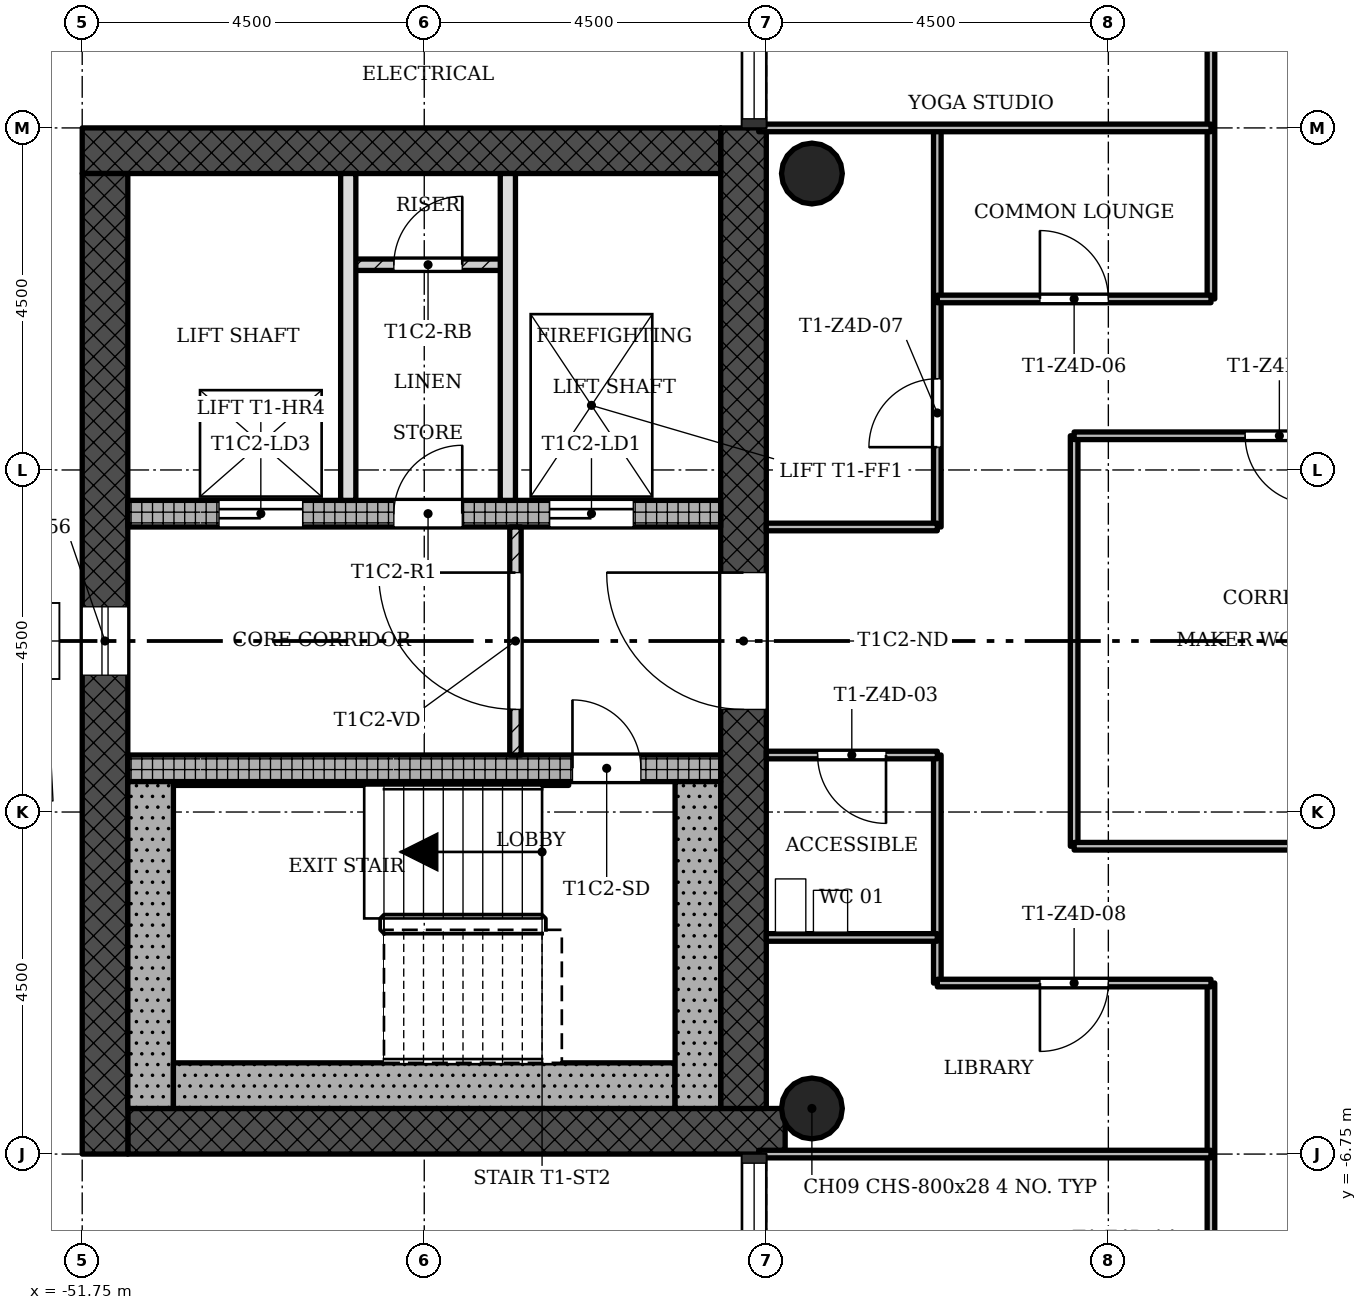
"""IFC4 building model, lengths in metres.
Left out: names, types, materials, properties, quantities, classifications, styles, units other than length and angle.
Written with IfcOpenShell. Run it as: python <this file> out.ifc"""

import sys

from ifc_helpers import new_model, si_unit, direction, frame, frame_2d, origin, origin_2d, place, context, subcontext, project, spatial, rectangle, hollow_circle, extrude, element, fill, save


model = new_model("IFC4")
c1 = context("Model", 3, precision=1e-05, world=origin(), true_north=direction((0.0, 1.0)))
c2 = subcontext(c1, "Body", "Model", "MODEL_VIEW")
j1 = project(units=[si_unit("LENGTHUNIT", "METRE"), si_unit("PLANEANGLEUNIT", "RADIAN")], contexts=[c1])
p1 = place(None, origin())
s1 = spatial("IfcSite", under=j1, at=p1, CompositionType="ELEMENT")
p2 = place(p1, origin())
s2 = spatial("IfcBuilding", under=s1, at=p2, CompositionType="ELEMENT")
p3 = place(p2, frame((0.0, 0.0, 202.8)))
s3 = spatial("IfcBuildingStorey", under=s2, at=p3, CompositionType="ELEMENT", Elevation=202.8)
p4 = place(p3, frame((-51.15, -6.45, 0.0), z_axis=(0.0, 0.0, 1.0), x_axis=(1.0, 0.0, 0.0)))
e1 = element("IfcWall", 1, at=p4, inside=s3, PredefinedType="SHEAR", context=c2, shape_type="SweptSolid", body=[
    extrude(rectangle(XDim=8.648, YDim=0.6, at=frame_2d((4.324, 0.0))), origin(), (0.0, 0.0, 1.0), 3.4),
])
p5 = place(p3, frame((-43.05, -6.15, 0.0), z_axis=(0.0, 0.0, 1.0), x_axis=(0.0, 1.0, 0.0)))
e2 = element("IfcWall", 2, at=p5, inside=s3, PredefinedType="SHEAR", context=c2, shape_type="SweptSolid", body=[
    extrude(rectangle(XDim=12.9, YDim=0.6, at=frame_2d((6.45, 0.0))), origin(), (0.0, 0.0, 1.0), 3.4),
])
p6 = place(p5, frame((5.25, 0.0, 0.0)))
e3 = element("IfcOpeningElement", 3, at=p6, cuts=e2, PredefinedType="OPENING", context=c2, shape_type="SweptSolid", body=[
    extrude(rectangle(XDim=1.8, YDim=2.1, at=frame_2d((0.9, 1.05))), frame((0.0, 0.31, 0.0), z_axis=(0.0, -1.0, 0.0), x_axis=(1.0, 0.0, 0.0)), (0.0, 0.0, 1.0), 0.62),
])
p7 = place(p3, frame((-43.35, 6.45, 0.0), z_axis=(0.0, 0.0, 1.0), x_axis=(-1.0, 0.0, 0.0)))
e4 = element("IfcWall", 4, at=p7, inside=s3, PredefinedType="SHEAR", context=c2, shape_type="SweptSolid", body=[
    extrude(rectangle(XDim=8.4, YDim=0.6, at=frame_2d((4.2, 0.0))), origin(), (0.0, 0.0, 1.0), 3.4),
])
p8 = place(p3, frame((-51.45, 6.15, 0.0), z_axis=(0.0, 0.0, 1.0), x_axis=(0.0, -1.0, 0.0)))
e5 = element("IfcWall", 5, at=p8, inside=s3, PredefinedType="SHEAR", context=c2, shape_type="SweptSolid", body=[
    extrude(rectangle(XDim=12.9, YDim=0.6, at=frame_2d((6.45, 0.0))), origin(), (0.0, 0.0, 1.0), 3.4),
])
p9 = place(p8, frame((5.7, 0.0, 0.45)))
e6 = element("IfcOpeningElement", 6, at=p9, cuts=e5, PredefinedType="OPENING", context=c2, shape_type="SweptSolid", body=[
    extrude(rectangle(XDim=0.9, YDim=2.4, at=frame_2d((0.45, 1.2))), frame((0.0, 0.31, 0.0), z_axis=(0.0, -1.0, 0.0), x_axis=(1.0, 0.0, 0.0)), (0.0, 0.0, 1.0), 0.62),
])
p10 = place(p3, frame((-51.15, -1.675, 0.0), z_axis=(0.0, 0.0, 1.0), x_axis=(1.0, 0.0, 0.0)))
e7 = element("IfcWall", 7, at=p10, inside=s3, PredefinedType="SHEAR", context=c2, shape_type="SweptSolid", body=[
    extrude(rectangle(XDim=7.8, YDim=0.35, at=frame_2d((3.9, 0.0))), origin(), (0.0, 0.0, 1.0), 3.4),
])
p11 = place(p10, frame((5.85, 0.0, 0.0)))
e8 = element("IfcOpeningElement", 8, at=p11, cuts=e7, PredefinedType="OPENING", context=c2, shape_type="SweptSolid", body=[
    extrude(rectangle(XDim=0.9, YDim=2.1, at=frame_2d((0.45, 1.05))), frame((0.0, 0.185, 0.0), z_axis=(0.0, -1.0, 0.0), x_axis=(1.0, 0.0, 0.0)), (0.0, 0.0, 1.0), 0.37),
])
p12 = place(p3, frame((-51.15, 1.675, 0.0), z_axis=(0.0, 0.0, 1.0), x_axis=(1.0, 0.0, 0.0)))
e9 = element("IfcWall", 9, at=p12, inside=s3, PredefinedType="SHEAR", context=c2, shape_type="SweptSolid", body=[
    extrude(rectangle(XDim=7.8, YDim=0.35, at=frame_2d((3.9, 0.0))), origin(), (0.0, 0.0, 1.0), 3.4),
])
p13 = place(p12, frame((5.55, 0.0, 0.0)))
e10 = element("IfcOpeningElement", 10, at=p13, cuts=e9, PredefinedType="OPENING", context=c2, shape_type="SweptSolid", body=[
    extrude(rectangle(XDim=1.1, YDim=2.1, at=frame_2d((0.55, 1.05))), frame((0.0, 0.185, 0.0), z_axis=(0.0, -1.0, 0.0), x_axis=(1.0, 0.0, 0.0)), (0.0, 0.0, 1.0), 0.37),
])
p14 = place(p12, frame((1.2, 0.0, 0.0)))
e11 = element("IfcOpeningElement", 11, at=p14, cuts=e9, PredefinedType="OPENING", context=c2, shape_type="SweptSolid", body=[
    extrude(rectangle(XDim=1.1, YDim=2.1, at=frame_2d((0.55, 1.05))), frame((0.0, 0.185, 0.0), z_axis=(0.0, -1.0, 0.0), x_axis=(1.0, 0.0, 0.0)), (0.0, 0.0, 1.0), 0.37),
])
p15 = place(p12, frame((3.5, 0.0, 0.0)))
e12 = element("IfcOpeningElement", 12, at=p15, cuts=e9, PredefinedType="OPENING", context=c2, shape_type="SweptSolid", body=[
    extrude(rectangle(XDim=0.9, YDim=2.1, at=frame_2d((0.45, 1.05))), frame((0.0, 0.185, 0.0), z_axis=(0.0, -1.0, 0.0), x_axis=(1.0, 0.0, 0.0)), (0.0, 0.0, 1.0), 0.37),
])
for number, where, z_axis, x_axis in (
    (13, (-42.15, -6.15, 0.0), (0.0, 0.0, 1.0), (1.0, 0.0, 0.0)),
    (14, (-42.15, 6.15, 0.0), (0.0, 0.0, 1.0), (1.0, 0.0, 0.0)),
):
    element("IfcColumn", number, at=place(p3, frame(where, z_axis=z_axis, x_axis=x_axis)), inside=s3, PredefinedType="COLUMN", context=c2, shape_type="SweptSolid", body=[
        extrude(hollow_circle(Radius=0.4, WallThickness=0.028, at=origin_2d()), origin(), (0.0, 0.0, 1.0), 3.4),
    ])
p16 = place(p3, frame((-46.05, 1.5, 0.0), z_axis=(0.0, 0.0, 1.0), x_axis=(0.0, -1.0, 0.0)))
e15 = element("IfcWall", 15, at=p16, inside=s3, PredefinedType="PARTITIONING", context=c2, shape_type="SweptSolid", body=[
    extrude(rectangle(XDim=3.0, YDim=0.15, at=frame_2d((1.5, 0.0))), origin(), (0.0, 0.0, 1.0), 3.0),
])
p17 = place(p16, frame((0.6, 0.0, 0.0)))
e16 = element("IfcOpeningElement", 16, at=p17, cuts=e15, PredefinedType="OPENING", context=c2, shape_type="SweptSolid", body=[
    extrude(rectangle(XDim=1.8, YDim=2.1, at=frame_2d((0.9, 1.05))), frame((0.0, 0.085, 0.0), z_axis=(0.0, -1.0, 0.0), x_axis=(1.0, 0.0, 0.0)), (0.0, 0.0, 1.0), 0.17),
])
for number, where, z_axis, x_axis in (
    (17, (-48.25, 6.15, 0.0), (0.0, 0.0, 1.0), (0.0, -1.0, 0.0)),
    (18, (-46.15, 6.15, 0.0), (0.0, 0.0, 1.0), (0.0, -1.0, 0.0)),
):
    element("IfcWall", number, at=place(p3, frame(where, z_axis=z_axis, x_axis=x_axis)), inside=s3, PredefinedType="SOLIDWALL", context=c2, shape_type="SweptSolid", body=[
        extrude(rectangle(XDim=4.3, YDim=0.2, at=frame_2d((2.15, 0.0))), origin(), (0.0, 0.0, 1.0), 3.0),
    ])
p18 = place(p3, frame((-46.15, 4.95, 0.0), z_axis=(0.0, 0.0, 1.0), x_axis=(-1.0, 0.0, 0.0)))
e19 = element("IfcWall", 19, at=p18, inside=s3, PredefinedType="PARTITIONING", context=c2, shape_type="SweptSolid", body=[
    extrude(rectangle(XDim=2.1, YDim=0.15, at=frame_2d((1.05, 0.0))), origin(), (0.0, 0.0, 1.0), 3.0),
])
p19 = place(p18, frame((0.6, 0.0, 0.0)))
e20 = element("IfcOpeningElement", 20, at=p19, cuts=e19, PredefinedType="OPENING", context=c2, shape_type="SweptSolid", body=[
    extrude(rectangle(XDim=0.9, YDim=2.1, at=frame_2d((0.45, 1.05))), frame((0.0, 0.085, 0.0), z_axis=(0.0, -1.0, 0.0), x_axis=(1.0, 0.0, 0.0)), (0.0, 0.0, 1.0), 0.17),
])
p20 = place(p3, frame((-40.5, -4.5, 0.0), z_axis=(0.0, 0.0, 1.0), x_axis=(0.0, 1.0, 0.0)))
e21 = element("IfcWall", 21, at=p20, inside=s3, PredefinedType="PARTITIONING", context=c2, shape_type="SweptSolid", body=[
    extrude(rectangle(XDim=3.0, YDim=0.1, at=frame_2d((1.5, 0.0))), origin(), (0.0, 0.0, 1.0), 3.0),
])
p21 = place(p3, frame((-40.5, 1.5, 0.0), z_axis=(0.0, 0.0, 1.0), x_axis=(0.0, 1.0, 0.0)))
e22 = element("IfcWall", 22, at=p21, inside=s3, PredefinedType="PARTITIONING", context=c2, shape_type="SweptSolid", body=[
    extrude(rectangle(XDim=5.25, YDim=0.1, at=frame_2d((2.625, 0.0))), origin(), (0.0, 0.0, 1.0), 3.0),
])
p22 = place(p21, frame((1.05, 0.0, 0.0)))
e23 = element("IfcOpeningElement", 23, at=p22, cuts=e22, PredefinedType="OPENING", context=c2, shape_type="SweptSolid", body=[
    extrude(rectangle(XDim=0.9, YDim=2.1, at=frame_2d((0.45, 1.05))), frame((0.0, 0.06, 0.0), z_axis=(0.0, -1.0, 0.0), x_axis=(1.0, 0.0, 0.0)), (0.0, 0.0, 1.0), 0.12),
])
p23 = place(p3, frame((-38.7, -2.7, 0.0), z_axis=(0.0, 0.0, 1.0), x_axis=(0.0, 1.0, 0.0)))
e24 = element("IfcWall", 24, at=p23, inside=s3, PredefinedType="PARTITIONING", context=c2, shape_type="SweptSolid", body=[
    extrude(rectangle(XDim=5.4, YDim=0.1, at=frame_2d((2.7, 0.0))), origin(), (0.0, 0.0, 1.0), 3.0),
])
p24 = place(p3, frame((-36.9, -11.25, 0.0), z_axis=(0.0, 0.0, 1.0), x_axis=(0.0, 1.0, 0.0)))
e25 = element("IfcWall", 25, at=p24, inside=s3, PredefinedType="PARTITIONING", context=c2, shape_type="SweptSolid", body=[
    extrude(rectangle(XDim=6.75, YDim=0.1, at=frame_2d((3.375, 0.0))), origin(), (0.0, 0.0, 1.0), 3.0),
])
p25 = place(p24, frame((1.8, 0.0, 0.0)))
e26 = element("IfcOpeningElement", 26, at=p25, cuts=e25, PredefinedType="OPENING", context=c2, shape_type="SweptSolid", body=[
    extrude(rectangle(XDim=0.9, YDim=2.1, at=frame_2d((0.45, 1.05))), frame((0.0, 0.06, 0.0), z_axis=(0.0, -1.0, 0.0), x_axis=(1.0, 0.0, 0.0)), (0.0, 0.0, 1.0), 0.12),
])
p26 = place(p3, frame((-36.9, 4.5, 0.0), z_axis=(0.0, 0.0, 1.0), x_axis=(0.0, 1.0, 0.0)))
e27 = element("IfcWall", 27, at=p26, inside=s3, PredefinedType="PARTITIONING", context=c2, shape_type="SweptSolid", body=[
    extrude(rectangle(XDim=4.05, YDim=0.1, at=frame_2d((2.025, 0.0))), origin(), (0.0, 0.0, 1.0), 3.0),
])
p27 = place(p3, frame((-42.85, -6.75, 0.0), z_axis=(0.0, 0.0, 1.0), x_axis=(1.0, 0.0, 0.0)))
e28 = element("IfcWall", 28, at=p27, inside=s3, PredefinedType="PARTITIONING", context=c2, shape_type="SweptSolid", body=[
    extrude(rectangle(XDim=5.95, YDim=0.1, at=frame_2d((2.975, 0.0))), origin(), (0.0, 0.0, 1.0), 3.0),
])
p28 = place(p3, frame((-40.5, -4.5, 0.0), z_axis=(0.0, 0.0, 1.0), x_axis=(1.0, 0.0, 0.0)))
e29 = element("IfcWall", 29, at=p28, inside=s3, PredefinedType="PARTITIONING", context=c2, shape_type="SweptSolid", body=[
    extrude(rectangle(XDim=3.6, YDim=0.1, at=frame_2d((1.8, 0.0))), origin(), (0.0, 0.0, 1.0), 3.0),
])
p29 = place(p28, frame((1.35, 0.0, 0.0)))
e30 = element("IfcOpeningElement", 30, at=p29, cuts=e29, PredefinedType="OPENING", context=c2, shape_type="SweptSolid", body=[
    extrude(rectangle(XDim=0.9, YDim=2.1, at=frame_2d((0.45, 1.05))), frame((0.0, 0.06, 0.0), z_axis=(0.0, -1.0, 0.0), x_axis=(1.0, 0.0, 0.0)), (0.0, 0.0, 1.0), 0.12),
])
p30 = place(p3, frame((-42.75, -3.9, 0.0), z_axis=(0.0, 0.0, 1.0), x_axis=(1.0, 0.0, 0.0)))
e31 = element("IfcWall", 31, at=p30, inside=s3, PredefinedType="PARTITIONING", context=c2, shape_type="SweptSolid", body=[
    extrude(rectangle(XDim=2.25, YDim=0.1, at=frame_2d((1.125, 0.0))), origin(), (0.0, 0.0, 1.0), 3.0),
])
p31 = place(p3, frame((-38.7, -2.7, 0.0), z_axis=(0.0, 0.0, 1.0), x_axis=(1.0, 0.0, 0.0)))
e32 = element("IfcWall", 32, at=p31, inside=s3, PredefinedType="PARTITIONING", context=c2, shape_type="SweptSolid", body=[
    extrude(rectangle(XDim=5.4, YDim=0.1, at=frame_2d((2.7, 0.0))), origin(), (0.0, 0.0, 1.0), 3.0),
])
p32 = place(p3, frame((-42.75, -1.5, 0.0), z_axis=(0.0, 0.0, 1.0), x_axis=(1.0, 0.0, 0.0)))
e33 = element("IfcWall", 33, at=p32, inside=s3, PredefinedType="PARTITIONING", context=c2, shape_type="SweptSolid", body=[
    extrude(rectangle(XDim=2.25, YDim=0.1, at=frame_2d((1.125, 0.0))), origin(), (0.0, 0.0, 1.0), 3.0),
])
p33 = place(p32, frame((0.675, 0.0, 0.0)))
e34 = element("IfcOpeningElement", 34, at=p33, cuts=e33, PredefinedType="OPENING", context=c2, shape_type="SweptSolid", body=[
    extrude(rectangle(XDim=0.9, YDim=2.1, at=frame_2d((0.45, 1.05))), frame((0.0, 0.06, 0.0), z_axis=(0.0, -1.0, 0.0), x_axis=(1.0, 0.0, 0.0)), (0.0, 0.0, 1.0), 0.12),
])
p34 = place(p3, frame((-42.75, 1.5, 0.0), z_axis=(0.0, 0.0, 1.0), x_axis=(1.0, 0.0, 0.0)))
e35 = element("IfcWall", 35, at=p34, inside=s3, PredefinedType="PARTITIONING", context=c2, shape_type="SweptSolid", body=[
    extrude(rectangle(XDim=2.25, YDim=0.1, at=frame_2d((1.125, 0.0))), origin(), (0.0, 0.0, 1.0), 3.0),
])
p35 = place(p3, frame((-38.7, 2.7, 0.0), z_axis=(0.0, 0.0, 1.0), x_axis=(1.0, 0.0, 0.0)))
e36 = element("IfcWall", 36, at=p35, inside=s3, PredefinedType="PARTITIONING", context=c2, shape_type="SweptSolid", body=[
    extrude(rectangle(XDim=5.4, YDim=0.1, at=frame_2d((2.7, 0.0))), origin(), (0.0, 0.0, 1.0), 3.0),
])
p36 = place(p35, frame((2.25, 0.0, 0.0)))
e37 = element("IfcOpeningElement", 37, at=p36, cuts=e36, PredefinedType="OPENING", context=c2, shape_type="SweptSolid", body=[
    extrude(rectangle(XDim=0.9, YDim=2.1, at=frame_2d((0.45, 1.05))), frame((0.0, 0.06, 0.0), z_axis=(0.0, -1.0, 0.0), x_axis=(1.0, 0.0, 0.0)), (0.0, 0.0, 1.0), 0.12),
])
p37 = place(p3, frame((-40.5, 4.5, 0.0), z_axis=(0.0, 0.0, 1.0), x_axis=(1.0, 0.0, 0.0)))
e38 = element("IfcWall", 38, at=p37, inside=s3, PredefinedType="PARTITIONING", context=c2, shape_type="SweptSolid", body=[
    extrude(rectangle(XDim=3.6, YDim=0.1, at=frame_2d((1.8, 0.0))), origin(), (0.0, 0.0, 1.0), 3.0),
])
p38 = place(p37, frame((1.35, 0.0, 0.0)))
e39 = element("IfcOpeningElement", 39, at=p38, cuts=e38, PredefinedType="OPENING", context=c2, shape_type="SweptSolid", body=[
    extrude(rectangle(XDim=0.9, YDim=2.1, at=frame_2d((0.45, 1.05))), frame((0.0, 0.06, 0.0), z_axis=(0.0, -1.0, 0.0), x_axis=(1.0, 0.0, 0.0)), (0.0, 0.0, 1.0), 0.12),
])
p39 = place(p3, frame((-42.85, 6.75, 0.0), z_axis=(0.0, 0.0, 1.0), x_axis=(1.0, 0.0, 0.0)))
e40 = element("IfcWall", 40, at=p39, inside=s3, PredefinedType="PARTITIONING", context=c2, shape_type="SweptSolid", body=[
    extrude(rectangle(XDim=5.95, YDim=0.1, at=frame_2d((2.975, 0.0))), origin(), (0.0, 0.0, 1.0), 3.0),
])
p40 = place(p3, frame((-50.85, -1.85, 0.0), z_axis=(0.0, 0.0, 1.0), x_axis=(0.0, -1.0, 0.0)))
e41 = element("IfcWall", 41, at=p40, inside=s3, PredefinedType="SHEAR", context=c2, shape_type="SweptSolid", body=[
    extrude(rectangle(XDim=4.3, YDim=0.6, at=frame_2d((2.15, 0.0))), origin(), (0.0, 0.0, 1.0), 3.4),
])
p41 = place(p3, frame((-43.95, -5.85, 0.0), z_axis=(0.0, 0.0, 1.0), x_axis=(-1.0, 0.0, 0.0)))
e42 = element("IfcWall", 42, at=p41, inside=s3, PredefinedType="SHEAR", context=c2, shape_type="SweptSolid", body=[
    extrude(rectangle(XDim=6.6, YDim=0.6, at=frame_2d((3.3, 0.0))), origin(), (0.0, 0.0, 1.0), 3.4),
])
p42 = place(p3, frame((-43.65, -1.85, 0.0), z_axis=(0.0, 0.0, 1.0), x_axis=(0.0, -1.0, 0.0)))
e43 = element("IfcWall", 43, at=p42, inside=s3, PredefinedType="SHEAR", context=c2, shape_type="SweptSolid", body=[
    extrude(rectangle(XDim=4.3, YDim=0.6, at=frame_2d((2.15, 0.0))), origin(), (0.0, 0.0, 1.0), 3.4),
])
p43 = place(p3, frame((-45.35, -1.875, 0.0), z_axis=(0.0, 0.0, 1.0), x_axis=(-1.0, 0.0, 0.0)))
e44 = element("IfcWall", 44, at=p43, inside=s3, PredefinedType="SHEAR", context=c2, shape_type="SweptSolid", body=[
    extrude(rectangle(XDim=5.2, YDim=0.05, at=frame_2d((2.6, 0.0))), origin(), (0.0, 0.0, 1.0), 3.4),
])
p44 = place(p9, origin())
e45 = element("IfcWindow", 45, at=p44, inside=s3, PartitioningType="SINGLE_PANEL", PredefinedType="WINDOW", context=c2, shape_type="SweptSolid", body=[
    extrude(rectangle(XDim=0.9, YDim=2.4, at=frame_2d((0.45, 1.2))), frame((0.0, 0.03, 0.0), z_axis=(0.0, -1.0, 0.0), x_axis=(1.0, 0.0, 0.0)), (0.0, 0.0, 1.0), 0.06),
])
fill(e6, e45)
p45 = place(p17, origin())
e46 = element("IfcDoor", 46, at=p45, inside=s3, OperationType="SINGLE_SWING_LEFT", PredefinedType="DOOR", context=c2, shape_type="SweptSolid", body=[
    extrude(rectangle(XDim=1.8, YDim=2.1, at=frame_2d((0.9, 1.05))), frame((0.0, 0.025, 0.0), z_axis=(0.0, -1.0, 0.0), x_axis=(1.0, 0.0, 0.0)), (0.0, 0.0, 1.0), 0.05),
])
fill(e16, e46)
p46 = place(p19, origin())
e47 = element("IfcDoor", 47, at=p46, inside=s3, OperationType="SINGLE_SWING_LEFT", PredefinedType="DOOR", context=c2, shape_type="SweptSolid", body=[
    extrude(rectangle(XDim=0.9, YDim=2.1, at=frame_2d((0.45, 1.05))), frame((0.0, 0.025, 0.0), z_axis=(0.0, -1.0, 0.0), x_axis=(1.0, 0.0, 0.0)), (0.0, 0.0, 1.0), 0.05),
])
fill(e20, e47)
p47 = place(p36, origin())
e48 = element("IfcDoor", 48, at=p47, inside=s3, OperationType="SINGLE_SWING_RIGHT", PredefinedType="DOOR", context=c2, shape_type="SweptSolid", body=[
    extrude(rectangle(XDim=0.9, YDim=2.1, at=frame_2d((0.45, 1.05))), frame((0.0, 0.025, 0.0), z_axis=(0.0, -1.0, 0.0), x_axis=(1.0, 0.0, 0.0)), (0.0, 0.0, 1.0), 0.05),
])
fill(e37, e48)
p48 = place(p33, origin())
e49 = element("IfcDoor", 49, at=p48, inside=s3, OperationType="SINGLE_SWING_RIGHT", PredefinedType="DOOR", context=c2, shape_type="SweptSolid", body=[
    extrude(rectangle(XDim=0.9, YDim=2.1, at=frame_2d((0.45, 1.05))), frame((0.0, 0.025, 0.0), z_axis=(0.0, -1.0, 0.0), x_axis=(1.0, 0.0, 0.0)), (0.0, 0.0, 1.0), 0.05),
])
fill(e34, e49)
p49 = place(p38, origin())
e50 = element("IfcDoor", 50, at=p49, inside=s3, OperationType="SINGLE_SWING_RIGHT", PredefinedType="DOOR", context=c2, shape_type="SweptSolid", body=[
    extrude(rectangle(XDim=0.9, YDim=2.1, at=frame_2d((0.45, 1.05))), frame((0.0, 0.025, 0.0), z_axis=(0.0, -1.0, 0.0), x_axis=(1.0, 0.0, 0.0)), (0.0, 0.0, 1.0), 0.05),
])
fill(e39, e50)
p50 = place(p22, origin())
e51 = element("IfcDoor", 51, at=p50, inside=s3, OperationType="SINGLE_SWING_RIGHT", PredefinedType="DOOR", context=c2, shape_type="SweptSolid", body=[
    extrude(rectangle(XDim=0.9, YDim=2.1, at=frame_2d((0.45, 1.05))), frame((0.0, 0.025, 0.0), z_axis=(0.0, -1.0, 0.0), x_axis=(1.0, 0.0, 0.0)), (0.0, 0.0, 1.0), 0.05),
])
fill(e23, e51)
p51 = place(p29, origin())
e52 = element("IfcDoor", 52, at=p51, inside=s3, OperationType="SINGLE_SWING_LEFT", PredefinedType="DOOR", context=c2, shape_type="SweptSolid", body=[
    extrude(rectangle(XDim=0.9, YDim=2.1, at=frame_2d((0.45, 1.05))), frame((0.0, 0.025, 0.0), z_axis=(0.0, -1.0, 0.0), x_axis=(1.0, 0.0, 0.0)), (0.0, 0.0, 1.0), 0.05),
])
fill(e30, e52)
p52 = place(p11, origin())
e53 = element("IfcDoor", 53, at=p52, inside=s3, OperationType="SINGLE_SWING_RIGHT", PredefinedType="DOOR", context=c2, shape_type="SweptSolid", body=[
    extrude(rectangle(XDim=0.9, YDim=2.1, at=frame_2d((0.45, 1.05))), frame((0.0, 0.025, 0.0), z_axis=(0.0, -1.0, 0.0), x_axis=(1.0, 0.0, 0.0)), (0.0, 0.0, 1.0), 0.05),
])
fill(e8, e53)
p53 = place(p13, origin())
e54 = element("IfcDoor", 54, at=p53, inside=s3, OperationType="SLIDING_TO_LEFT", PredefinedType="DOOR", context=c2, shape_type="SweptSolid", body=[
    extrude(rectangle(XDim=1.1, YDim=2.1, at=frame_2d((0.55, 1.05))), frame((0.0, 0.025, 0.0), z_axis=(0.0, -1.0, 0.0), x_axis=(1.0, 0.0, 0.0)), (0.0, 0.0, 1.0), 0.05),
])
fill(e10, e54)
p54 = place(p14, origin())
e55 = element("IfcDoor", 55, at=p54, inside=s3, OperationType="SLIDING_TO_LEFT", PredefinedType="DOOR", context=c2, shape_type="SweptSolid", body=[
    extrude(rectangle(XDim=1.1, YDim=2.1, at=frame_2d((0.55, 1.05))), frame((0.0, 0.025, 0.0), z_axis=(0.0, -1.0, 0.0), x_axis=(1.0, 0.0, 0.0)), (0.0, 0.0, 1.0), 0.05),
])
fill(e11, e55)
p55 = place(p15, origin())
e56 = element("IfcDoor", 56, at=p55, inside=s3, OperationType="SINGLE_SWING_LEFT", PredefinedType="DOOR", context=c2, shape_type="SweptSolid", body=[
    extrude(rectangle(XDim=0.9, YDim=2.1, at=frame_2d((0.45, 1.05))), frame((0.0, 0.025, 0.0), z_axis=(0.0, -1.0, 0.0), x_axis=(1.0, 0.0, 0.0)), (0.0, 0.0, 1.0), 0.05),
])
fill(e12, e56)
p56 = place(p6, origin())
e57 = element("IfcDoor", 57, at=p56, inside=s3, OperationType="SINGLE_SWING_LEFT", PredefinedType="DOOR", context=c2, shape_type="SweptSolid", body=[
    extrude(rectangle(XDim=1.8, YDim=2.1, at=frame_2d((0.9, 1.05))), frame((0.0, 0.025, 0.0), z_axis=(0.0, -1.0, 0.0), x_axis=(1.0, 0.0, 0.0)), (0.0, 0.0, 1.0), 0.05),
])
fill(e3, e57)
save(model, sys.argv[1])
